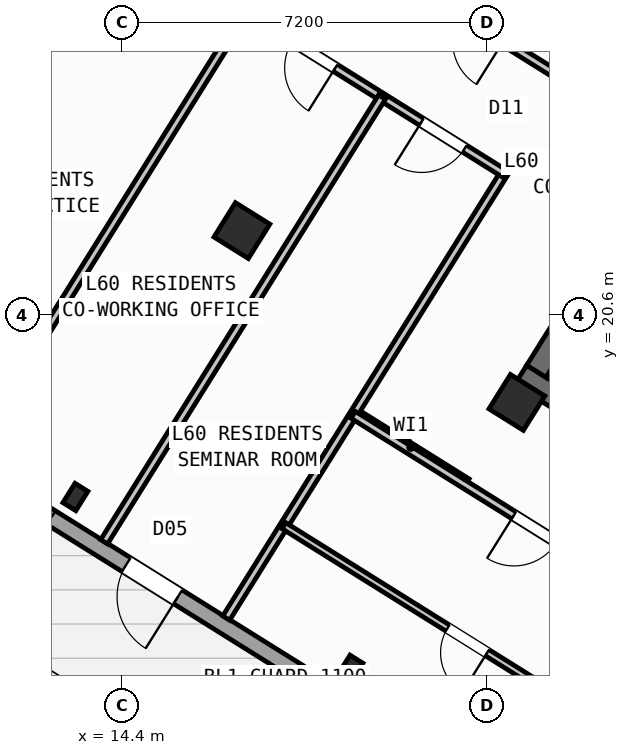
"""IFC4 building model, lengths in metres.
Left out: names, types, materials, properties, quantities, classifications, styles, units other than length and angle.
Written with IfcOpenShell. Run it as: python <this file> out.ifc"""

import sys

from ifc_helpers import new_model, si_unit, direction, frame, frame_2d, origin, origin_2d, place, context, subcontext, project, spatial, rectangle, hollow_rectangle, i_section, extrude, source, transform, mapped, element, fill, save


model = new_model("IFC4")
c1 = context("Model", 3, precision=1e-05, world=origin(), true_north=direction((0.0, 1.0)))
c2 = subcontext(c1, "Body", "Model", "MODEL_VIEW")
j1 = project(units=[si_unit("LENGTHUNIT", "METRE"), si_unit("PLANEANGLEUNIT", "RADIAN")], contexts=[c1])
p1 = place(None, origin())
s1 = spatial("IfcSite", under=j1, at=p1, CompositionType="ELEMENT")
p2 = place(p1, origin())
s2 = spatial("IfcBuilding", under=s1, at=p2, CompositionType="ELEMENT")
p3 = place(p2, frame((0.0, 0.0, 238.5)))
s3 = spatial("IfcBuildingStorey", under=s2, at=p3, CompositionType="ELEMENT", Elevation=238.5)
p4 = place(p3, frame((33.324, 12.503, 0.0), z_axis=(0.0, 0.0, 1.0), x_axis=(-0.848043529849, 0.529926571782, 0.0)))
e1 = element("IfcWall", 1, at=p4, inside=s3, PredefinedType="SHEAR", context=c2, shape_type="SweptSolid", body=[
    extrude(rectangle(XDim=13.04, YDim=0.45, at=frame_2d((6.52, 0.0))), origin(), (0.0, 0.0, 1.0), 3.35),
])
p5 = place(p3, frame((26.007, 24.976, 0.0), z_axis=(0.0, 0.0, 1.0), x_axis=(-0.529931155655, -0.848040665456, 0.0)))
e2 = element("IfcWall", 2, at=p5, inside=s3, PredefinedType="SHEAR", context=c2, shape_type="SweptSolid", body=[
    extrude(rectangle(XDim=6.475, YDim=0.45, at=frame_2d((3.238, 0.0))), origin(), (0.0, 0.0, 1.0), 3.35),
])
m1 = source(origin(), c2, "Body", "SweptSolid", [
    extrude(hollow_rectangle(XDim=0.8, YDim=0.8, WallThickness=0.032, at=origin_2d()), origin(), (0.0, 0.0, 1.0), 3.6),
])
p6 = place(p3, frame((22.191, 18.87, 0.0), z_axis=(0.0, 0.0, 1.0), x_axis=(-0.848048096156, 0.529919264233, 0.0)))
e3 = element("IfcColumn", 3, at=p6, inside=s3, PredefinedType="COLUMN", context=c2, shape_type="MappedRepresentation", body=[
    mapped(m1, transform((0.0, 0.0, 0.0), scale=1.0)),
])
m2 = source(origin(), c2, "Body", "SweptSolid", [
    extrude(i_section(OverallWidth=0.3, OverallDepth=0.45, WebThickness=0.014, FlangeThickness=0.026, at=origin_2d()), origin(), (0.0, 0.0, 1.0), 3.6),
])
p7 = place(p3, frame((18.906, 13.612, 0.0), z_axis=(0.0, 0.0, 1.0), x_axis=(-0.848048096156, 0.529919264233, 0.0)))
e4 = element("IfcColumn", 4, at=p7, inside=s3, PredefinedType="COLUMN", context=c2, shape_type="MappedRepresentation", body=[
    mapped(m2, transform((0.0, 0.0, 0.0), scale=1.0)),
])
p8 = place(p3, frame((16.764, 22.261, 0.0), z_axis=(0.0, 0.0, 1.0), x_axis=(-0.848048096156, 0.529919264233, 0.0)))
e5 = element("IfcColumn", 5, at=p8, inside=s3, PredefinedType="COLUMN", context=c2, shape_type="MappedRepresentation", body=[
    mapped(m1, transform((0.0, 0.0, 0.0), scale=1.0)),
])
p9 = place(p3, frame((13.478, 17.003, 0.0), z_axis=(0.0, 0.0, 1.0), x_axis=(-0.848048096156, 0.529919264233, 0.0)))
e6 = element("IfcColumn", 6, at=p9, inside=s3, PredefinedType="COLUMN", context=c2, shape_type="MappedRepresentation", body=[
    mapped(m2, transform((0.0, 0.0, 0.0), scale=1.0)),
])
p10 = place(p3, frame((29.268, 6.429, 0.0), z_axis=(0.0, 0.0, 1.0), x_axis=(-0.848049971435, 0.529916263149, 0.0)))
e7 = element("IfcWall", 7, at=p10, inside=s3, PredefinedType="STANDARD", context=c2, shape_type="SweptSolid", body=[
    extrude(rectangle(XDim=31.588, YDim=0.32, at=frame_2d((15.794, 0.0))), origin(), (0.0, 0.0, 1.0), 3.35),
])
p11 = place(p10, frame((16.235, 0.0, 0.0)))
e8 = element("IfcOpeningElement", 8, at=p11, cuts=e7, PredefinedType="OPENING", context=c2, shape_type="SweptSolid", body=[
    extrude(rectangle(XDim=1.2, YDim=2.15, at=frame_2d((0.6, 1.075))), frame((0.0, 0.17, 0.0), z_axis=(0.0, -1.0, 0.0), x_axis=(1.0, 0.0, 0.0)), (0.0, 0.0, 1.0), 0.34),
])
p12 = place(p10, frame((3.859, 0.0, 0.9)))
e9 = element("IfcOpeningElement", 9, at=p12, cuts=e7, PredefinedType="OPENING", context=c2, shape_type="SweptSolid", body=[
    extrude(rectangle(XDim=1.65, YDim=1.45, at=frame_2d((0.825, 0.725))), frame((0.0, 0.17, 0.0), z_axis=(0.0, -1.0, 0.0), x_axis=(1.0, 0.0, 0.0)), (0.0, 0.0, 1.0), 0.34),
])
p13 = place(p10, frame((10.519, 0.0, 0.9)))
e10 = element("IfcOpeningElement", 10, at=p13, cuts=e7, PredefinedType="OPENING", context=c2, shape_type="SweptSolid", body=[
    extrude(rectangle(XDim=1.65, YDim=1.45, at=frame_2d((0.825, 0.725))), frame((0.0, 0.17, 0.0), z_axis=(0.0, -1.0, 0.0), x_axis=(1.0, 0.0, 0.0)), (0.0, 0.0, 1.0), 0.34),
])
p14 = place(p10, frame((19.182, 0.0, 1.0)))
e11 = element("IfcOpeningElement", 11, at=p14, cuts=e7, PredefinedType="OPENING", context=c2, shape_type="SweptSolid", body=[
    extrude(rectangle(XDim=0.9, YDim=1.25, at=frame_2d((0.45, 0.625))), frame((0.0, 0.17, 0.0), z_axis=(0.0, -1.0, 0.0), x_axis=(1.0, 0.0, 0.0)), (0.0, 0.0, 1.0), 0.34),
])
p15 = place(p10, frame((22.524, 0.0, 1.0)))
e12 = element("IfcOpeningElement", 12, at=p15, cuts=e7, PredefinedType="OPENING", context=c2, shape_type="SweptSolid", body=[
    extrude(rectangle(XDim=0.9, YDim=1.25, at=frame_2d((0.45, 0.625))), frame((0.0, 0.17, 0.0), z_axis=(0.0, -1.0, 0.0), x_axis=(1.0, 0.0, 0.0)), (0.0, 0.0, 1.0), 0.34),
])
p16 = place(p10, frame((25.658, 0.0, 0.9)))
e13 = element("IfcOpeningElement", 13, at=p16, cuts=e7, PredefinedType="OPENING", context=c2, shape_type="SweptSolid", body=[
    extrude(rectangle(XDim=1.65, YDim=1.45, at=frame_2d((0.825, 0.725))), frame((0.0, 0.17, 0.0), z_axis=(0.0, -1.0, 0.0), x_axis=(1.0, 0.0, 0.0)), (0.0, 0.0, 1.0), 0.34),
])
p17 = place(p10, frame((29.278, 0.0, 0.9)))
e14 = element("IfcOpeningElement", 14, at=p17, cuts=e7, PredefinedType="OPENING", context=c2, shape_type="SweptSolid", body=[
    extrude(rectangle(XDim=1.35, YDim=1.45, at=frame_2d((0.675, 0.725))), frame((0.0, 0.17, 0.0), z_axis=(0.0, -1.0, 0.0), x_axis=(1.0, 0.0, 0.0)), (0.0, 0.0, 1.0), 0.34),
])
p18 = place(p3, frame((2.415, 23.452, 0.0), z_axis=(0.0, 0.0, 1.0), x_axis=(0.52991049553, 0.848053575387, 0.0)))
e15 = element("IfcWall", 15, at=p18, inside=s3, PredefinedType="STANDARD", context=c2, shape_type="SweptSolid", body=[
    extrude(rectangle(XDim=21.587, YDim=0.32, at=frame_2d((10.794, 0.0))), origin(), (0.0, 0.0, 1.0), 2.875),
])
p19 = place(p18, frame((2.581, 0.0, 0.9)))
e16 = element("IfcOpeningElement", 16, at=p19, cuts=e15, PredefinedType="OPENING", context=c2, shape_type="SweptSolid", body=[
    extrude(rectangle(XDim=1.65, YDim=1.45, at=frame_2d((0.825, 0.725))), frame((0.0, 0.17, 0.0), z_axis=(0.0, -1.0, 0.0), x_axis=(1.0, 0.0, 0.0)), (0.0, 0.0, 1.0), 0.34),
])
p20 = place(p18, frame((7.879, 0.0, 0.9)))
e17 = element("IfcOpeningElement", 17, at=p20, cuts=e15, PredefinedType="OPENING", context=c2, shape_type="SweptSolid", body=[
    extrude(rectangle(XDim=1.35, YDim=1.45, at=frame_2d((0.675, 0.725))), frame((0.0, 0.17, 0.0), z_axis=(0.0, -1.0, 0.0), x_axis=(1.0, 0.0, 0.0)), (0.0, 0.0, 1.0), 0.34),
])
p21 = place(p18, frame((16.954, 0.0, 0.95)))
e18 = element("IfcOpeningElement", 18, at=p21, cuts=e15, PredefinedType="OPENING", context=c2, shape_type="SweptSolid", body=[
    extrude(rectangle(XDim=1.95, YDim=1.35, at=frame_2d((0.975, 0.675))), frame((0.0, 0.17, 0.0), z_axis=(0.0, -1.0, 0.0), x_axis=(1.0, 0.0, 0.0)), (0.0, 0.0, 1.0), 0.34),
])
p22 = place(p3, frame((14.138, 41.825, 0.0), z_axis=(0.0, 0.0, 1.0), x_axis=(0.848046498049, -0.529921821731, 0.0)))
e19 = element("IfcWall", 19, at=p22, inside=s3, PredefinedType="STANDARD", context=c2, shape_type="SweptSolid", body=[
    extrude(rectangle(XDim=31.588, YDim=0.32, at=frame_2d((15.794, 0.0))), origin(), (0.0, 0.0, 1.0), 3.35),
])
p23 = place(p22, frame((9.712, 0.0, 0.0)))
e20 = element("IfcOpeningElement", 20, at=p23, cuts=e19, PredefinedType="OPENING", context=c2, shape_type="SweptSolid", body=[
    extrude(rectangle(XDim=1.05, YDim=2.15, at=frame_2d((0.525, 1.075))), frame((0.0, 0.17, 0.0), z_axis=(0.0, -1.0, 0.0), x_axis=(1.0, 0.0, 0.0)), (0.0, 0.0, 1.0), 0.34),
])
p24 = place(p22, frame((0.841, 0.0, 0.9)))
e21 = element("IfcOpeningElement", 21, at=p24, cuts=e19, PredefinedType="OPENING", context=c2, shape_type="SweptSolid", body=[
    extrude(rectangle(XDim=1.65, YDim=1.45, at=frame_2d((0.825, 0.725))), frame((0.0, 0.17, 0.0), z_axis=(0.0, -1.0, 0.0), x_axis=(1.0, 0.0, 0.0)), (0.0, 0.0, 1.0), 0.34),
])
p25 = place(p22, frame((4.171, 0.0, 1.0)))
e22 = element("IfcOpeningElement", 22, at=p25, cuts=e19, PredefinedType="OPENING", context=c2, shape_type="SweptSolid", body=[
    extrude(rectangle(XDim=0.9, YDim=1.25, at=frame_2d((0.45, 0.625))), frame((0.0, 0.17, 0.0), z_axis=(0.0, -1.0, 0.0), x_axis=(1.0, 0.0, 0.0)), (0.0, 0.0, 1.0), 0.34),
])
p26 = place(p22, frame((13.624, 0.0, 0.95)))
e23 = element("IfcOpeningElement", 23, at=p26, cuts=e19, PredefinedType="OPENING", context=c2, shape_type="SweptSolid", body=[
    extrude(rectangle(XDim=1.95, YDim=1.35, at=frame_2d((0.975, 0.675))), frame((0.0, 0.17, 0.0), z_axis=(0.0, -1.0, 0.0), x_axis=(1.0, 0.0, 0.0)), (0.0, 0.0, 1.0), 0.34),
])
p27 = place(p22, frame((17.129, 0.0, 1.0)))
e24 = element("IfcOpeningElement", 24, at=p27, cuts=e19, PredefinedType="OPENING", context=c2, shape_type="SweptSolid", body=[
    extrude(rectangle(XDim=0.9, YDim=1.25, at=frame_2d((0.45, 0.625))), frame((0.0, 0.17, 0.0), z_axis=(0.0, -1.0, 0.0), x_axis=(1.0, 0.0, 0.0)), (0.0, 0.0, 1.0), 0.34),
])
p28 = place(p22, frame((21.744, 0.0, 0.9)))
e25 = element("IfcOpeningElement", 25, at=p28, cuts=e19, PredefinedType="OPENING", context=c2, shape_type="SweptSolid", body=[
    extrude(rectangle(XDim=1.65, YDim=1.45, at=frame_2d((0.825, 0.725))), frame((0.0, 0.17, 0.0), z_axis=(0.0, -1.0, 0.0), x_axis=(1.0, 0.0, 0.0)), (0.0, 0.0, 1.0), 0.34),
])
p29 = place(p22, frame((27.394, 0.0, 0.9)))
e26 = element("IfcOpeningElement", 26, at=p29, cuts=e19, PredefinedType="OPENING", context=c2, shape_type="SweptSolid", body=[
    extrude(rectangle(XDim=1.65, YDim=1.45, at=frame_2d((0.825, 0.725))), frame((0.0, 0.17, 0.0), z_axis=(0.0, -1.0, 0.0), x_axis=(1.0, 0.0, 0.0)), (0.0, 0.0, 1.0), 0.34),
])
p30 = place(p3, frame((21.206, 17.292, 0.0), z_axis=(0.0, 0.0, 1.0), x_axis=(-0.848050851465, 0.529914854792, 0.0)))
e27 = element("IfcWall", 27, at=p30, inside=s3, PredefinedType="PARTITIONING", context=c2, shape_type="SweptSolid", body=[
    extrude(rectangle(XDim=2.61, YDim=0.16, at=frame_2d((1.305, 0.0))), origin(), (0.0, 0.0, 1.0), 3.34),
])
p31 = place(p3, frame((21.938, 23.391, 0.0), z_axis=(0.0, 0.0, 1.0), x_axis=(-0.529924725692, -0.848044683434, 0.0)))
e28 = element("IfcWall", 28, at=p31, inside=s3, PredefinedType="PARTITIONING", context=c2, shape_type="SweptSolid", body=[
    extrude(rectangle(XDim=10.35, YDim=0.16, at=frame_2d((5.175, 0.0))), origin(), (0.0, 0.0, 1.0), 3.34),
])
p32 = place(p3, frame((23.104, 25.256, 0.0), z_axis=(0.0, 0.0, 1.0), x_axis=(-0.848041752158, 0.529929416617, 0.0)))
e29 = element("IfcWall", 29, at=p32, inside=s3, PredefinedType="PARTITIONING", context=c2, shape_type="SweptSolid", body=[
    extrude(rectangle(XDim=16.73, YDim=0.16, at=frame_2d((8.365, 0.0))), origin(), (0.0, 0.0, 1.0), 3.34),
])
p33 = place(p32, frame((1.395, 0.0, 0.0)))
e30 = element("IfcOpeningElement", 30, at=p33, cuts=e29, PredefinedType="OPENING", context=c2, shape_type="SweptSolid", body=[
    extrude(rectangle(XDim=1.0, YDim=2.1, at=frame_2d((0.5, 1.05))), frame((0.0, 0.09, 0.0), z_axis=(0.0, -1.0, 0.0), x_axis=(1.0, 0.0, 0.0)), (0.0, 0.0, 1.0), 0.18),
])
p34 = place(p32, frame((7.82, 0.0, 0.0)))
e31 = element("IfcOpeningElement", 31, at=p34, cuts=e29, PredefinedType="OPENING", context=c2, shape_type="SweptSolid", body=[
    extrude(rectangle(XDim=1.0, YDim=2.1, at=frame_2d((0.5, 1.05))), frame((0.0, 0.09, 0.0), z_axis=(0.0, -1.0, 0.0), x_axis=(1.0, 0.0, 0.0)), (0.0, 0.0, 1.0), 0.18),
])
p35 = place(p32, frame((11.14, 0.0, 0.0)))
e32 = element("IfcOpeningElement", 32, at=p35, cuts=e29, PredefinedType="OPENING", context=c2, shape_type="SweptSolid", body=[
    extrude(rectangle(XDim=1.0, YDim=2.1, at=frame_2d((0.5, 1.05))), frame((0.0, 0.09, 0.0), z_axis=(0.0, -1.0, 0.0), x_axis=(1.0, 0.0, 0.0)), (0.0, 0.0, 1.0), 0.18),
])
p36 = place(p3, frame((21.938, 23.391, 0.0), z_axis=(0.0, 0.0, 1.0), x_axis=(-0.848045850158, 0.529922858565, 0.0)))
e33 = element("IfcWall", 33, at=p36, inside=s3, PredefinedType="PARTITIONING", context=c2, shape_type="SweptSolid", body=[
    extrude(rectangle(XDim=16.73, YDim=0.16, at=frame_2d((8.365, 0.0))), origin(), (0.0, 0.0, 1.0), 3.34),
])
p37 = place(p36, frame((0.92, 0.0, 0.0)))
e34 = element("IfcOpeningElement", 34, at=p37, cuts=e33, PredefinedType="OPENING", context=c2, shape_type="SweptSolid", body=[
    extrude(rectangle(XDim=1.0, YDim=2.1, at=frame_2d((0.5, 1.05))), frame((0.0, 0.09, 0.0), z_axis=(0.0, -1.0, 0.0), x_axis=(1.0, 0.0, 0.0)), (0.0, 0.0, 1.0), 0.18),
])
p38 = place(p36, frame((3.928, 0.0, 0.0)))
e35 = element("IfcOpeningElement", 35, at=p38, cuts=e33, PredefinedType="OPENING", context=c2, shape_type="SweptSolid", body=[
    extrude(rectangle(XDim=1.0, YDim=2.1, at=frame_2d((0.5, 1.05))), frame((0.0, 0.09, 0.0), z_axis=(0.0, -1.0, 0.0), x_axis=(1.0, 0.0, 0.0)), (0.0, 0.0, 1.0), 0.18),
])
p39 = place(p36, frame((7.271, 0.0, 0.0)))
e36 = element("IfcOpeningElement", 36, at=p39, cuts=e33, PredefinedType="OPENING", context=c2, shape_type="SweptSolid", body=[
    extrude(rectangle(XDim=1.0, YDim=2.1, at=frame_2d((0.5, 1.05))), frame((0.0, 0.09, 0.0), z_axis=(0.0, -1.0, 0.0), x_axis=(1.0, 0.0, 0.0)), (0.0, 0.0, 1.0), 0.18),
])
p40 = place(p36, frame((10.78, 0.0, 0.0)))
e37 = element("IfcOpeningElement", 37, at=p40, cuts=e33, PredefinedType="OPENING", context=c2, shape_type="SweptSolid", body=[
    extrude(rectangle(XDim=1.0, YDim=2.1, at=frame_2d((0.5, 1.05))), frame((0.0, 0.09, 0.0), z_axis=(0.0, -1.0, 0.0), x_axis=(1.0, 0.0, 0.0)), (0.0, 0.0, 1.0), 0.18),
])
p41 = place(p36, frame((14.372, 0.0, 0.0)))
e38 = element("IfcOpeningElement", 38, at=p41, cuts=e33, PredefinedType="OPENING", context=c2, shape_type="SweptSolid", body=[
    extrude(rectangle(XDim=1.0, YDim=2.1, at=frame_2d((0.5, 1.05))), frame((0.0, 0.09, 0.0), z_axis=(0.0, -1.0, 0.0), x_axis=(1.0, 0.0, 0.0)), (0.0, 0.0, 1.0), 0.18),
])
p42 = place(p3, frame((19.529, 24.896, 0.0), z_axis=(0.0, 0.0, 1.0), x_axis=(-0.529914125013, -0.848051307476, 0.0)))
e39 = element("IfcWall", 39, at=p42, inside=s3, PredefinedType="PARTITIONING", context=c2, shape_type="SweptSolid", body=[
    extrude(rectangle(XDim=10.35, YDim=0.16, at=frame_2d((5.175, 0.0))), origin(), (0.0, 0.0, 1.0), 3.34),
])
p43 = place(p3, frame((16.837, 26.579, 0.0), z_axis=(0.0, 0.0, 1.0), x_axis=(-0.529941690036, -0.848034082547, 0.0)))
e40 = element("IfcWall", 40, at=p43, inside=s3, PredefinedType="PARTITIONING", context=c2, shape_type="SweptSolid", body=[
    extrude(rectangle(XDim=10.35, YDim=0.16, at=frame_2d((5.175, 0.0))), origin(), (0.0, 0.0, 1.0), 3.025),
])
p44 = place(p3, frame((13.861, 28.438, 0.0), z_axis=(0.0, 0.0, 1.0), x_axis=(-0.529931089283, -0.848040706931, 0.0)))
e41 = element("IfcWall", 41, at=p44, inside=s3, PredefinedType="PARTITIONING", context=c2, shape_type="SweptSolid", body=[
    extrude(rectangle(XDim=10.35, YDim=0.16, at=frame_2d((5.175, 0.0))), origin(), (0.0, 0.0, 1.0), 3.34),
])
p45 = place(p3, frame((32.164, 10.374, 0.0), z_axis=(0.0, 0.0, 1.0), x_axis=(-0.848044107957, 0.529925646633, 0.0)))
e42 = element("IfcWall", 42, at=p45, inside=s3, PredefinedType="PARTITIONING", context=c2, shape_type="SweptSolid", body=[
    extrude(rectangle(XDim=15.57, YDim=0.16, at=frame_2d((7.785, 0.0))), origin(), (0.0, 0.0, 1.0), 3.34),
])
p46 = place(p45, frame((10.83, 0.0, 0.0)))
e43 = element("IfcOpeningElement", 43, at=p46, cuts=e42, PredefinedType="OPENING", context=c2, shape_type="SweptSolid", body=[
    extrude(rectangle(XDim=1.0, YDim=2.1, at=frame_2d((0.5, 1.05))), frame((0.0, 0.09, 0.0), z_axis=(0.0, -1.0, 0.0), x_axis=(1.0, 0.0, 0.0)), (0.0, 0.0, 1.0), 0.18),
])
p47 = place(p3, frame((29.72, 8.859, 0.0), z_axis=(0.0, 0.0, 1.0), x_axis=(-0.848049134363, 0.529917602752, 0.0)))
e44 = element("IfcWall", 44, at=p47, inside=s3, PredefinedType="PLUMBINGWALL", context=c2, shape_type="SweptSolid", body=[
    extrude(rectangle(XDim=14.3, YDim=0.14, at=frame_2d((7.15, 0.0))), origin(), (0.0, 0.0, 1.0), 3.34),
])
p48 = place(p47, frame((9.57, 0.0, 0.0)))
e45 = element("IfcOpeningElement", 45, at=p48, cuts=e44, PredefinedType="OPENING", context=c2, shape_type="SweptSolid", body=[
    extrude(rectangle(XDim=0.92, YDim=2.08, at=frame_2d((0.46, 1.04))), frame((0.0, 0.08, 0.0), z_axis=(0.0, -1.0, 0.0), x_axis=(1.0, 0.0, 0.0)), (0.0, 0.0, 1.0), 0.16),
])
m3 = source(origin(), c2, "Body", "SweptSolid", [
    extrude(rectangle(XDim=1.2, YDim=2.15, at=frame_2d((0.6, 1.075))), frame((0.0, 0.025, 0.0), z_axis=(0.0, -1.0, 0.0), x_axis=(1.0, 0.0, 0.0)), (0.0, 0.0, 1.0), 0.05),
])
p49 = place(p11, origin())
e46 = element("IfcDoor", 46, at=p49, inside=s3, OperationType="SINGLE_SWING_LEFT", PredefinedType="DOOR", context=c2, shape_type="MappedRepresentation", body=[
    mapped(m3, transform((0.0, 0.0, 0.0), scale=1.0)),
])
fill(e8, e46)
m4 = source(origin(), c2, "Body", "SweptSolid", [
    extrude(rectangle(XDim=0.9, YDim=1.25, at=frame_2d((0.45, 0.625))), frame((0.0, 0.03, 0.0), z_axis=(0.0, -1.0, 0.0), x_axis=(1.0, 0.0, 0.0)), (0.0, 0.0, 1.0), 0.06),
])
p50 = place(p14, origin())
e47 = element("IfcWindow", 47, at=p50, inside=s3, PartitioningType="SINGLE_PANEL", PredefinedType="WINDOW", context=c2, shape_type="MappedRepresentation", body=[
    mapped(m4, transform((0.0, 0.0, 0.0), scale=1.0)),
])
fill(e11, e47)
m5 = source(origin(), c2, "Body", "SweptSolid", [
    extrude(rectangle(XDim=1.0, YDim=2.1, at=frame_2d((0.5, 1.05))), frame((0.0, 0.025, 0.0), z_axis=(0.0, -1.0, 0.0), x_axis=(1.0, 0.0, 0.0)), (0.0, 0.0, 1.0), 0.05),
])
p51 = place(p37, origin())
e48 = element("IfcDoor", 48, at=p51, inside=s3, OperationType="SINGLE_SWING_RIGHT", PredefinedType="DOOR", context=c2, shape_type="MappedRepresentation", body=[
    mapped(m5, transform((0.0, 0.0, 0.0), scale=1.0)),
])
fill(e34, e48)
p52 = place(p38, origin())
e49 = element("IfcDoor", 49, at=p52, inside=s3, OperationType="SINGLE_SWING_LEFT", PredefinedType="DOOR", context=c2, shape_type="MappedRepresentation", body=[
    mapped(m5, transform((0.0, 0.0, 0.0), scale=1.0)),
])
fill(e35, e49)
p53 = place(p46, origin())
e50 = element("IfcDoor", 50, at=p53, inside=s3, OperationType="SINGLE_SWING_RIGHT", PredefinedType="DOOR", context=c2, shape_type="MappedRepresentation", body=[
    mapped(m5, transform((0.0, 0.0, 0.0), scale=1.0)),
])
fill(e43, e50)
m6 = source(origin(), c2, "Body", "SweptSolid", [
    extrude(rectangle(XDim=0.92, YDim=2.08, at=frame_2d((0.46, 1.04))), frame((0.0, 0.025, 0.0), z_axis=(0.0, -1.0, 0.0), x_axis=(1.0, 0.0, 0.0)), (0.0, 0.0, 1.0), 0.05),
])
p54 = place(p48, origin())
e51 = element("IfcDoor", 51, at=p54, inside=s3, OperationType="SINGLE_SWING_LEFT", PredefinedType="DOOR", context=c2, shape_type="MappedRepresentation", body=[
    mapped(m6, transform((0.0, 0.0, 0.0), scale=1.0)),
])
fill(e45, e51)
save(model, sys.argv[1])
